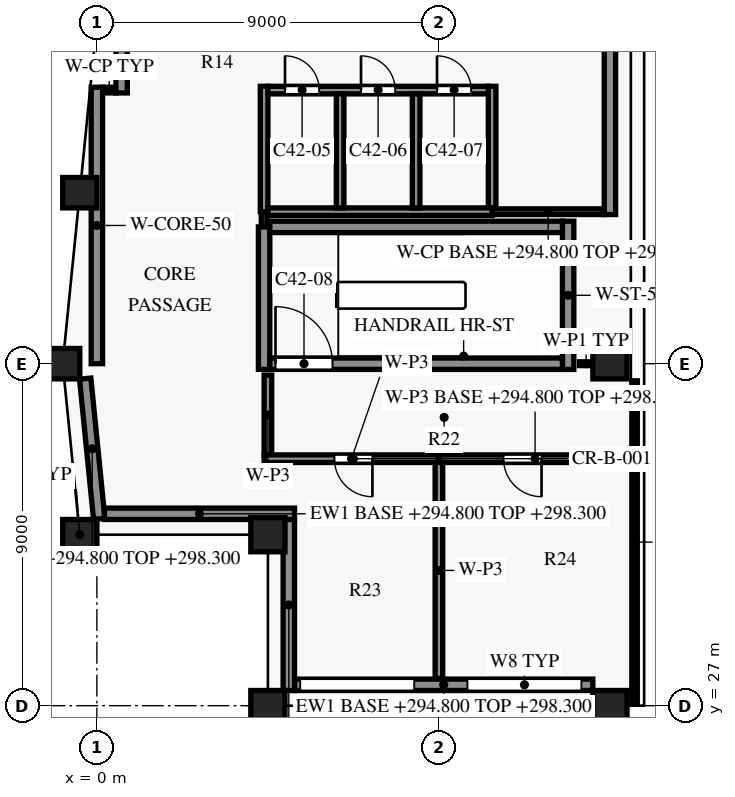
"""IFC4 building model, lengths in metres.
Left out: names, types, materials, properties, quantities, classifications, styles, units other than length and angle.
Written with IfcOpenShell. Run it as: python <this file> out.ifc"""

import sys

from ifc_helpers import new_model, si_unit, direction, frame, frame_2d, origin, origin_2d, place, context, subcontext, project, spatial, rectangle, extrude, element, fill, save


model = new_model("IFC4")
c1 = context("Model", 3, precision=1e-05, world=origin(), true_north=direction((0.0, 1.0)))
c2 = subcontext(c1, "Body", "Model", "MODEL_VIEW")
j1 = project(units=[si_unit("LENGTHUNIT", "METRE"), si_unit("PLANEANGLEUNIT", "RADIAN")], contexts=[c1])
p1 = place(None, origin())
s1 = spatial("IfcSite", under=j1, at=p1, CompositionType="ELEMENT")
p2 = place(p1, origin())
s2 = spatial("IfcBuilding", under=s1, at=p2, CompositionType="ELEMENT")
p3 = place(p2, frame((0.0, 0.0, 294.8)))
s3 = spatial("IfcBuildingStorey", under=s2, at=p3, CompositionType="ELEMENT", Elevation=294.8)
for number, where, z_axis, x_axis in (
    (1, (4.5, 27.0, 0.0), (0.0, 0.0, 1.0), (1.0, 0.0, 0.0)),
    (2, (13.5, 27.0, 0.0), (0.0, 0.0, 1.0), (1.0, 0.0, 0.0)),
    (3, (13.5, 36.0, 0.0), (0.0, 0.0, 1.0), (1.0, 0.0, 0.0)),
    (4, (-0.45, 40.5, 0.0), (0.0, 0.0, 1.0), (-0.1, -0.995, 0.0)),
    (5, (-0.9, 36.0, 0.0), (0.0, 0.0, 1.0), (0.0, -1.0, 0.0)),
    (6, (-0.45, 31.5, 0.0), (0.0, 0.0, 1.0), (0.1, -0.995, 0.0)),
):
    element("IfcColumn", number, at=place(p3, frame(where, z_axis=z_axis, x_axis=x_axis)), inside=s3, PredefinedType="COLUMN", context=c2, shape_type="SweptSolid", body=[
        extrude(rectangle(XDim=0.9, YDim=0.8, at=origin_2d()), origin(), (0.0, 0.0, 1.0), 4.0),
    ])
p4 = place(p3, frame((4.5, 31.5, 0.0), z_axis=(0.0, 0.0, 1.0), x_axis=(1.0, 0.0, 0.0)))
e7 = element("IfcColumn", 7, at=p4, inside=s3, PredefinedType="COLUMN", context=c2, shape_type="SweptSolid", body=[
    extrude(rectangle(XDim=0.9, YDim=0.9, at=origin_2d()), origin(), (0.0, 0.0, 1.0), 4.0),
])
p5 = place(p3, frame((13.05, 27.55, 0.0), z_axis=(0.0, 0.0, 1.0), x_axis=(-1.0, 0.0, 0.0)))
e8 = element("IfcWall", 8, at=p5, inside=s3, PredefinedType="SOLIDWALL", context=c2, shape_type="SweptSolid", body=[
    extrude(rectangle(XDim=7.85, YDim=0.3, at=frame_2d((3.925, 0.0))), origin(), (0.0, 0.0, 1.0), 3.5),
])
p6 = place(p5, frame((0.3, 0.0, 0.9)))
e9 = element("IfcOpeningElement", 9, at=p6, cuts=e8, PredefinedType="OPENING", context=c2, shape_type="SweptSolid", body=[
    extrude(rectangle(XDim=3.0, YDim=1.8, at=frame_2d((1.5, 0.9))), frame((0.0, 0.16, 0.0), z_axis=(0.0, -1.0, 0.0), x_axis=(1.0, 0.0, 0.0)), (0.0, 0.0, 1.0), 0.32),
])
p7 = place(p5, frame((4.7, 0.0, 0.9)))
e10 = element("IfcOpeningElement", 10, at=p7, cuts=e8, PredefinedType="OPENING", context=c2, shape_type="SweptSolid", body=[
    extrude(rectangle(XDim=3.0, YDim=1.8, at=frame_2d((1.5, 0.9))), frame((0.0, 0.16, 0.0), z_axis=(0.0, -1.0, 0.0), x_axis=(1.0, 0.0, 0.0)), (0.0, 0.0, 1.0), 0.32),
])
p8 = place(p3, frame((0.061, 31.915, 0.0), z_axis=(0.0, 0.0, 1.0), x_axis=(-0.099549320092, 0.995032629048, 0.0)))
e11 = element("IfcWall", 11, at=p8, inside=s3, PredefinedType="SOLIDWALL", context=c2, shape_type="SweptSolid", body=[
    extrude(rectangle(XDim=3.71, YDim=0.3, at=frame_2d((1.855, 0.0))), origin(), (0.0, 0.0, 1.0), 3.5),
])
p9 = place(p3, frame((5.2, 32.05, 0.0), z_axis=(0.0, 0.0, 1.0), x_axis=(-1.0, 0.0, 0.0)))
e12 = element("IfcWall", 12, at=p9, inside=s3, PredefinedType="SOLIDWALL", context=c2, shape_type="SweptSolid", body=[
    extrude(rectangle(XDim=5.0, YDim=0.3, at=frame_2d((2.5, 0.0))), origin(), (0.0, 0.0, 1.0), 3.5),
])
p10 = place(p3, frame((5.05, 27.4, 0.0), z_axis=(0.0, 0.0, 1.0), x_axis=(0.0, 1.0, 0.0)))
e13 = element("IfcWall", 13, at=p10, inside=s3, PredefinedType="SOLIDWALL", context=c2, shape_type="SweptSolid", body=[
    extrude(rectangle(XDim=4.502, YDim=0.3, at=frame_2d((2.251, 0.0))), origin(), (0.0, 0.0, 1.0), 3.5),
])
p11 = place(p3, frame((4.55, 36.0, 0.0), z_axis=(0.0, 0.0, 1.0), x_axis=(1.0, 0.0, 0.0)))
e14 = element("IfcWall", 14, at=p11, inside=s3, PredefinedType="SHEAR", context=c2, shape_type="SweptSolid", body=[
    extrude(rectangle(XDim=7.7, YDim=0.3, at=frame_2d((3.85, 0.0))), origin(), (0.0, 0.0, 1.0), 3.7),
])
p12 = place(p11, frame((0.15, 0.0, 0.0)))
e15 = element("IfcOpeningElement", 15, at=p12, cuts=e14, PredefinedType="OPENING", context=c2, shape_type="SweptSolid", body=[
    extrude(rectangle(XDim=1.5, YDim=2.2, at=frame_2d((0.75, 1.1))), frame((0.0, 0.16, 0.0), z_axis=(0.0, -1.0, 0.0), x_axis=(1.0, 0.0, 0.0)), (0.0, 0.0, 1.0), 0.32),
])
p13 = place(p3, frame((4.55, 39.6, 0.0), z_axis=(0.0, 0.0, 1.0), x_axis=(1.0, 0.0, 0.0)))
e16 = element("IfcWall", 16, at=p13, inside=s3, PredefinedType="SHEAR", context=c2, shape_type="SweptSolid", body=[
    extrude(rectangle(XDim=7.7, YDim=0.3, at=frame_2d((3.85, 0.0))), origin(), (0.0, 0.0, 1.0), 3.7),
])
p14 = place(p3, frame((10.4, 40.0, 0.0), z_axis=(0.0, 0.0, 1.0), x_axis=(1.0, 0.0, 0.0)))
e17 = element("IfcWall", 17, at=p14, inside=s3, PredefinedType="PARTITIONING", context=c2, shape_type="SweptSolid", body=[
    extrude(rectangle(XDim=2.95, YDim=0.15, at=frame_2d((1.475, 0.0))), origin(), (0.0, 0.0, 1.0), 3.35),
])
p15 = place(p3, frame((4.5, 40.0, 0.0), z_axis=(0.0, 0.0, 1.0), x_axis=(1.0, 0.0, 0.0)))
e18 = element("IfcWall", 18, at=p15, inside=s3, PredefinedType="PARTITIONING", context=c2, shape_type="SweptSolid", body=[
    extrude(rectangle(XDim=5.9, YDim=0.2, at=frame_2d((2.95, 0.0))), origin(), (0.0, 0.0, 1.0), 3.7),
])
p16 = place(p3, frame((0.15, 43.2, 0.0), z_axis=(0.0, 0.0, 1.0), x_axis=(1.0, 0.0, 0.0)))
e19 = element("IfcWall", 19, at=p16, inside=s3, PredefinedType="PARTITIONING", context=c2, shape_type="SweptSolid", body=[
    extrude(rectangle(XDim=0.35, YDim=0.15, at=frame_2d((0.175, 0.0))), origin(), (0.0, 0.0, 1.0), 3.7),
])
p17 = place(p3, frame((4.5, 43.2, 0.0), z_axis=(0.0, 0.0, 1.0), x_axis=(1.0, 0.0, 0.0)))
e20 = element("IfcWall", 20, at=p17, inside=s3, PredefinedType="PARTITIONING", context=c2, shape_type="SweptSolid", body=[
    extrude(rectangle(XDim=5.8, YDim=0.2, at=frame_2d((2.9, 0.0))), origin(), (0.0, 0.0, 1.0), 3.7),
])
p18 = place(p17, frame((0.45, 0.0, 0.0)))
e21 = element("IfcOpeningElement", 21, at=p18, cuts=e20, PredefinedType="OPENING", context=c2, shape_type="SweptSolid", body=[
    extrude(rectangle(XDim=0.9, YDim=2.1, at=frame_2d((0.45, 1.05))), frame((0.0, 0.11, 0.0), z_axis=(0.0, -1.0, 0.0), x_axis=(1.0, 0.0, 0.0)), (0.0, 0.0, 1.0), 0.22),
])
p19 = place(p17, frame((2.45, 0.0, 0.0)))
e22 = element("IfcOpeningElement", 22, at=p19, cuts=e20, PredefinedType="OPENING", context=c2, shape_type="SweptSolid", body=[
    extrude(rectangle(XDim=0.9, YDim=2.1, at=frame_2d((0.45, 1.05))), frame((0.0, 0.11, 0.0), z_axis=(0.0, -1.0, 0.0), x_axis=(1.0, 0.0, 0.0)), (0.0, 0.0, 1.0), 0.22),
])
p20 = place(p17, frame((4.45, 0.0, 0.0)))
e23 = element("IfcOpeningElement", 23, at=p20, cuts=e20, PredefinedType="OPENING", context=c2, shape_type="SweptSolid", body=[
    extrude(rectangle(XDim=0.9, YDim=2.1, at=frame_2d((0.45, 1.05))), frame((0.0, 0.11, 0.0), z_axis=(0.0, -1.0, 0.0), x_axis=(1.0, 0.0, 0.0)), (0.0, 0.0, 1.0), 0.22),
])
p21 = place(p3, frame((0.0, 36.0, 0.0), z_axis=(0.0, 0.0, 1.0), x_axis=(0.0, 1.0, 0.0)))
e24 = element("IfcWall", 24, at=p21, inside=s3, PredefinedType="SHEAR", context=c2, shape_type="SweptSolid", body=[
    extrude(rectangle(XDim=7.275, YDim=0.3, at=frame_2d((3.637, 0.0))), origin(), (0.0, 0.0, 1.0), 3.7),
])
p22 = place(p3, frame((0.65, 43.125, 0.0), z_axis=(0.0, 0.0, 1.0), x_axis=(0.0, 1.0, 0.0)))
e25 = element("IfcWall", 25, at=p22, inside=s3, PredefinedType="SHEAR", context=c2, shape_type="SweptSolid", body=[
    extrude(rectangle(XDim=3.775, YDim=0.3, at=frame_2d((1.887, 0.0))), origin(), (0.0, 0.0, 1.0), 3.7),
])
p23 = place(p3, frame((4.4, 39.6, 0.0), z_axis=(0.0, 0.0, 1.0), x_axis=(0.0, 1.0, 0.0)))
e26 = element("IfcWall", 26, at=p23, inside=s3, PredefinedType="PARTITIONING", context=c2, shape_type="SweptSolid", body=[
    extrude(rectangle(XDim=0.4, YDim=0.15, at=frame_2d((0.2, 0.0))), origin(), (0.0, 0.0, 1.0), 3.7),
])
p24 = place(p3, frame((4.4, 40.0, 0.0), z_axis=(0.0, 0.0, 1.0), x_axis=(0.0, 1.0, 0.0)))
e27 = element("IfcWall", 27, at=p24, inside=s3, PredefinedType="PARTITIONING", context=c2, shape_type="SweptSolid", body=[
    extrude(rectangle(XDim=3.3, YDim=0.2, at=frame_2d((1.65, 0.0))), origin(), (0.0, 0.0, 1.0), 3.7),
])
p25 = place(p3, frame((4.4, 35.85, 0.0), z_axis=(0.0, 0.0, 1.0), x_axis=(0.0, 1.0, 0.0)))
e28 = element("IfcWall", 28, at=p25, inside=s3, PredefinedType="SHEAR", context=c2, shape_type="SweptSolid", body=[
    extrude(rectangle(XDim=3.75, YDim=0.3, at=frame_2d((1.875, 0.0))), origin(), (0.0, 0.0, 1.0), 3.7),
])
for number, where, z_axis, x_axis in (
    (29, (6.4, 40.1, 0.0), (0.0, 0.0, 1.0), (0.0, 1.0, 0.0)),
    (30, (8.4, 40.1, 0.0), (0.0, 0.0, 1.0), (0.0, 1.0, 0.0)),
):
    element("IfcWall", number, at=place(p3, frame(where, z_axis=z_axis, x_axis=x_axis)), inside=s3, PredefinedType="PARTITIONING", context=c2, shape_type="SweptSolid", body=[
        extrude(rectangle(XDim=3.0, YDim=0.2, at=frame_2d((1.5, 0.0))), origin(), (0.0, 0.0, 1.0), 3.7),
    ])
p26 = place(p3, frame((10.4, 40.1, 0.0), z_axis=(0.0, 0.0, 1.0), x_axis=(0.0, 1.0, 0.0)))
e31 = element("IfcWall", 31, at=p26, inside=s3, PredefinedType="PARTITIONING", context=c2, shape_type="SweptSolid", body=[
    extrude(rectangle(XDim=3.2, YDim=0.2, at=frame_2d((1.6, 0.0))), origin(), (0.0, 0.0, 1.0), 3.7),
])
p27 = place(p3, frame((12.4, 35.85, 0.0), z_axis=(0.0, 0.0, 1.0), x_axis=(0.0, 1.0, 0.0)))
e32 = element("IfcWall", 32, at=p27, inside=s3, PredefinedType="SHEAR", context=c2, shape_type="SweptSolid", body=[
    extrude(rectangle(XDim=3.9, YDim=0.3, at=frame_2d((1.95, 0.0))), origin(), (0.0, 0.0, 1.0), 3.7),
])
p28 = place(p3, frame((13.5, 39.925, 0.0), z_axis=(0.0, 0.0, 1.0), x_axis=(0.0, 1.0, 0.0)))
e33 = element("IfcWall", 33, at=p28, inside=s3, PredefinedType="SHEAR", context=c2, shape_type="SweptSolid", body=[
    extrude(rectangle(XDim=19.075, YDim=0.3, at=frame_2d((9.538, 0.0))), origin(), (0.0, 0.0, 1.0), 3.7),
])
p29 = place(p3, frame((9.0, 33.4, 0.0), z_axis=(0.0, 0.0, 1.0), x_axis=(0.0, -1.0, 0.0)))
e34 = element("IfcWall", 34, at=p29, inside=s3, PredefinedType="PARTITIONING", context=c2, shape_type="SweptSolid", body=[
    extrude(rectangle(XDim=5.68, YDim=0.2, at=frame_2d((2.84, 0.0))), origin(), (0.0, 0.0, 1.0), 3.68),
])
p30 = place(p3, frame((9.0, 33.5, 0.0), z_axis=(0.0, 0.0, 1.0), x_axis=(-1.0, 0.0, 0.0)))
e35 = element("IfcWall", 35, at=p30, inside=s3, PredefinedType="PARTITIONING", context=c2, shape_type="SweptSolid", body=[
    extrude(rectangle(XDim=4.6, YDim=0.2, at=frame_2d((2.3, 0.0))), origin(), (0.0, 0.0, 1.0), 3.68),
])
p31 = place(p30, frame((1.75, 0.0, 0.0)))
e36 = element("IfcOpeningElement", 36, at=p31, cuts=e35, PredefinedType="OPENING", context=c2, shape_type="SweptSolid", body=[
    extrude(rectangle(XDim=1.0, YDim=2.1, at=frame_2d((0.5, 1.05))), frame((0.0, 0.11, 0.0), z_axis=(0.0, -1.0, 0.0), x_axis=(1.0, 0.0, 0.0)), (0.0, 0.0, 1.0), 0.22),
])
p32 = place(p3, frame((14.06, 33.5, 0.0), z_axis=(0.0, 0.0, 1.0), x_axis=(-1.0, 0.0, 0.0)))
e37 = element("IfcWall", 37, at=p32, inside=s3, PredefinedType="PARTITIONING", context=c2, shape_type="SweptSolid", body=[
    extrude(rectangle(XDim=5.06, YDim=0.2, at=frame_2d((2.53, 0.0))), origin(), (0.0, 0.0, 1.0), 3.33),
])
p33 = place(p32, frame((2.36, 0.0, 0.0)))
e38 = element("IfcOpeningElement", 38, at=p33, cuts=e37, PredefinedType="OPENING", context=c2, shape_type="SweptSolid", body=[
    extrude(rectangle(XDim=1.0, YDim=2.1, at=frame_2d((0.5, 1.05))), frame((0.0, 0.11, 0.0), z_axis=(0.0, -1.0, 0.0), x_axis=(1.0, 0.0, 0.0)), (0.0, 0.0, 1.0), 0.22),
])
p34 = place(p3, frame((4.5, 33.6, 0.0), z_axis=(0.0, 0.0, 1.0), x_axis=(0.0, 1.0, 0.0)))
e39 = element("IfcWall", 39, at=p34, inside=s3, PredefinedType="PARTITIONING", context=c2, shape_type="SweptSolid", body=[
    extrude(rectangle(XDim=2.1, YDim=0.2, at=frame_2d((1.05, 0.0))), origin(), (0.0, 0.0, 1.0), 3.68),
])
p35 = place(p3, frame((12.7, 36.0, 0.0), z_axis=(0.0, 0.0, 1.0), x_axis=(1.0, 0.0, 0.0)))
e40 = element("IfcWall", 40, at=p35, inside=s3, PredefinedType="PARTITIONING", context=c2, shape_type="SweptSolid", body=[
    extrude(rectangle(XDim=0.345, YDim=0.1, at=frame_2d((0.172, 0.0))), origin(), (0.0, 0.0, 1.0), 3.68),
])
p36 = place(p6, origin())
e41 = element("IfcWindow", 41, at=p36, inside=s3, PartitioningType="SINGLE_PANEL", PredefinedType="WINDOW", context=c2, shape_type="SweptSolid", body=[
    extrude(rectangle(XDim=3.0, YDim=1.8, at=frame_2d((1.5, 0.9))), frame((0.0, 0.03, 0.0), z_axis=(0.0, -1.0, 0.0), x_axis=(1.0, 0.0, 0.0)), (0.0, 0.0, 1.0), 0.06),
])
fill(e9, e41)
p37 = place(p7, origin())
e42 = element("IfcWindow", 42, at=p37, inside=s3, PartitioningType="SINGLE_PANEL", PredefinedType="WINDOW", context=c2, shape_type="SweptSolid", body=[
    extrude(rectangle(XDim=3.0, YDim=1.8, at=frame_2d((1.5, 0.9))), frame((0.0, 0.03, 0.0), z_axis=(0.0, -1.0, 0.0), x_axis=(1.0, 0.0, 0.0)), (0.0, 0.0, 1.0), 0.06),
])
fill(e10, e42)
p38 = place(p18, origin())
e43 = element("IfcDoor", 43, at=p38, inside=s3, OperationType="SINGLE_SWING_LEFT", PredefinedType="DOOR", context=c2, shape_type="SweptSolid", body=[
    extrude(rectangle(XDim=0.9, YDim=2.1, at=frame_2d((0.45, 1.05))), frame((0.0, 0.025, 0.0), z_axis=(0.0, -1.0, 0.0), x_axis=(1.0, 0.0, 0.0)), (0.0, 0.0, 1.0), 0.05),
])
fill(e21, e43)
p39 = place(p19, origin())
e44 = element("IfcDoor", 44, at=p39, inside=s3, OperationType="SINGLE_SWING_RIGHT", PredefinedType="DOOR", context=c2, shape_type="SweptSolid", body=[
    extrude(rectangle(XDim=0.9, YDim=2.1, at=frame_2d((0.45, 1.05))), frame((0.0, 0.025, 0.0), z_axis=(0.0, -1.0, 0.0), x_axis=(1.0, 0.0, 0.0)), (0.0, 0.0, 1.0), 0.05),
])
fill(e22, e44)
p40 = place(p20, origin())
e45 = element("IfcDoor", 45, at=p40, inside=s3, OperationType="SINGLE_SWING_LEFT", PredefinedType="DOOR", context=c2, shape_type="SweptSolid", body=[
    extrude(rectangle(XDim=0.9, YDim=2.1, at=frame_2d((0.45, 1.05))), frame((0.0, 0.025, 0.0), z_axis=(0.0, -1.0, 0.0), x_axis=(1.0, 0.0, 0.0)), (0.0, 0.0, 1.0), 0.05),
])
fill(e23, e45)
p41 = place(p12, origin())
e46 = element("IfcDoor", 46, at=p41, inside=s3, OperationType="SINGLE_SWING_RIGHT", PredefinedType="DOOR", context=c2, shape_type="SweptSolid", body=[
    extrude(rectangle(XDim=1.5, YDim=2.2, at=frame_2d((0.75, 1.1))), frame((0.0, 0.025, 0.0), z_axis=(0.0, -1.0, 0.0), x_axis=(1.0, 0.0, 0.0)), (0.0, 0.0, 1.0), 0.05),
])
fill(e15, e46)
p42 = place(p31, origin())
e47 = element("IfcDoor", 47, at=p42, inside=s3, OperationType="SINGLE_SWING_RIGHT", PredefinedType="DOOR", context=c2, shape_type="SweptSolid", body=[
    extrude(rectangle(XDim=1.0, YDim=2.1, at=frame_2d((0.5, 1.05))), frame((0.0, 0.025, 0.0), z_axis=(0.0, -1.0, 0.0), x_axis=(1.0, 0.0, 0.0)), (0.0, 0.0, 1.0), 0.05),
])
fill(e36, e47)
p43 = place(p33, origin())
e48 = element("IfcDoor", 48, at=p43, inside=s3, OperationType="SINGLE_SWING_LEFT", PredefinedType="DOOR", context=c2, shape_type="SweptSolid", body=[
    extrude(rectangle(XDim=1.0, YDim=2.1, at=frame_2d((0.5, 1.05))), frame((0.0, 0.025, 0.0), z_axis=(0.0, -1.0, 0.0), x_axis=(1.0, 0.0, 0.0)), (0.0, 0.0, 1.0), 0.05),
])
fill(e38, e48)
save(model, sys.argv[1])
